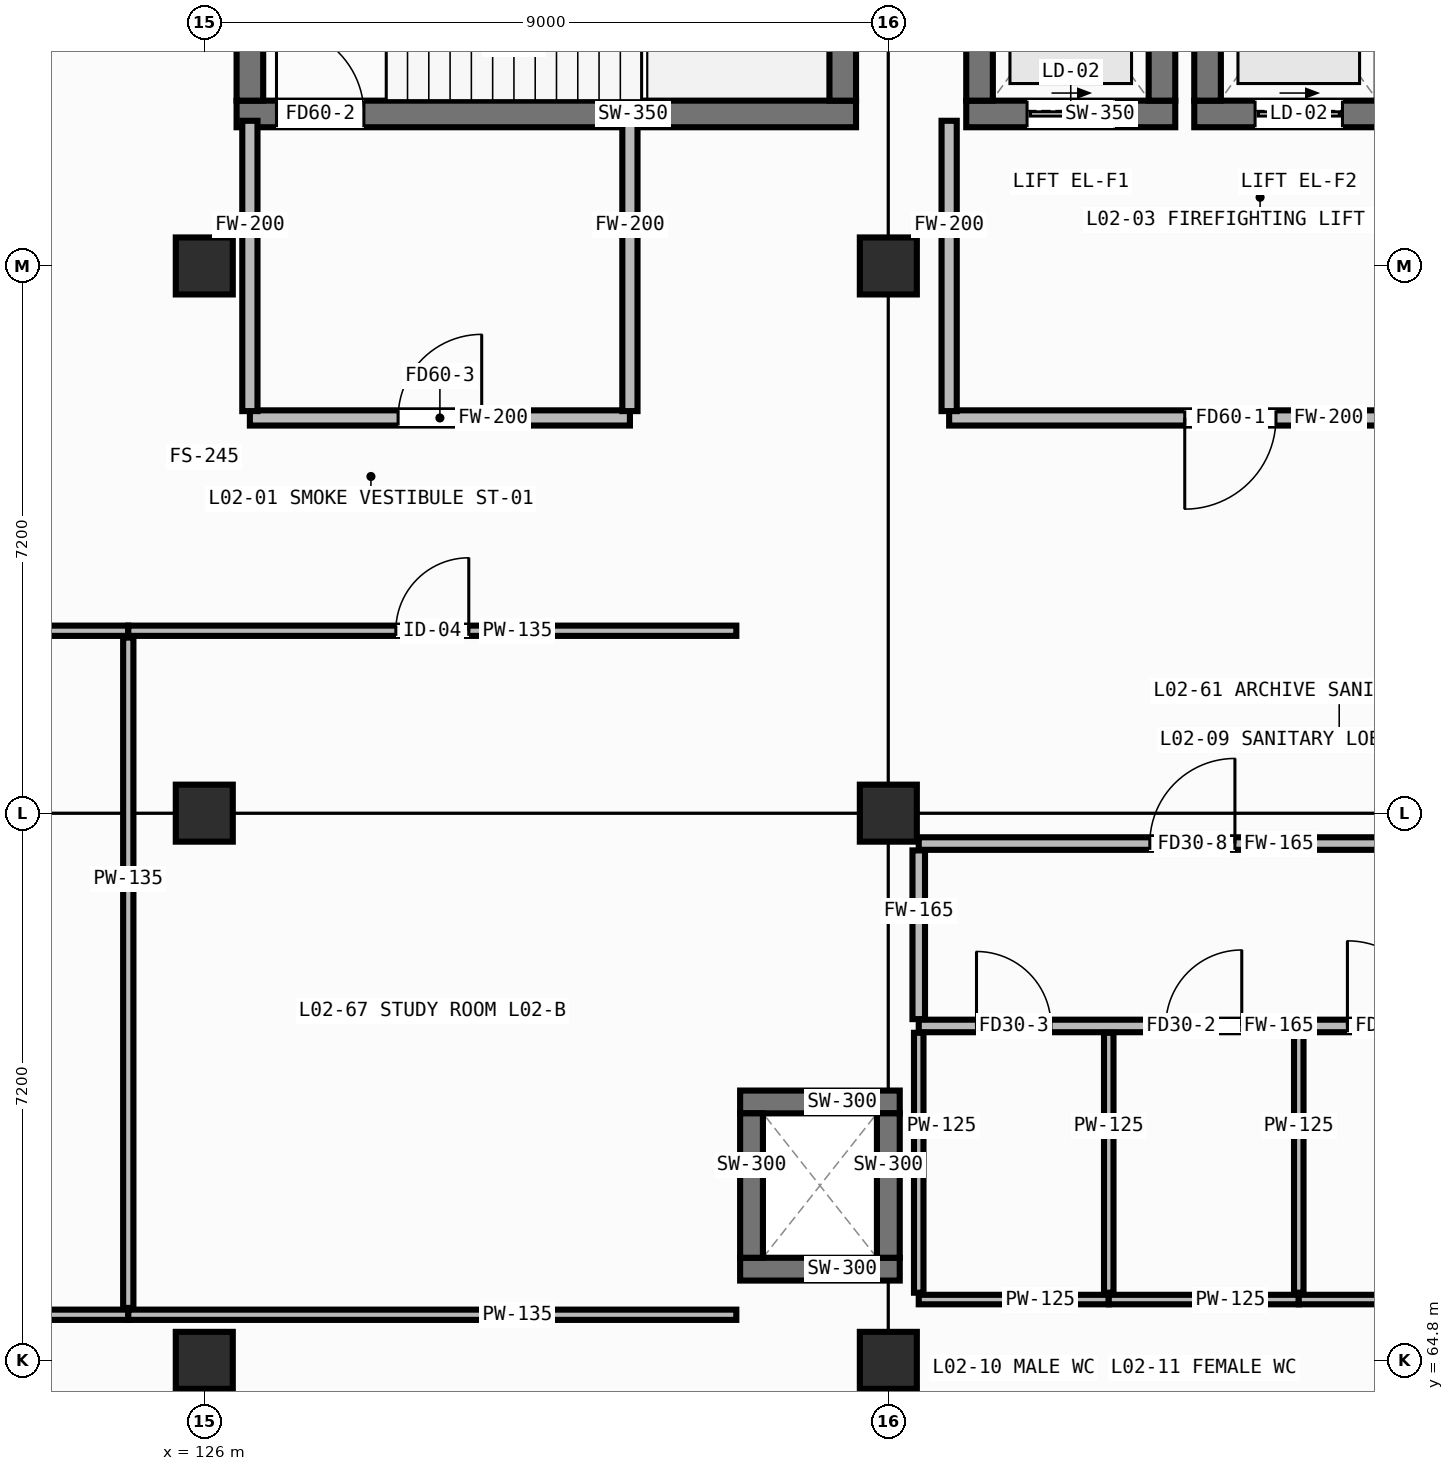
"""IFC4 building model, lengths in metres.
Left out: names, types, materials, properties, quantities, classifications, styles, units other than length and angle.
Written with IfcOpenShell. Run it as: python <this file> out.ifc"""

import sys

from ifc_helpers import new_model, si_unit, direction, frame, frame_2d, origin, origin_2d, place, context, subcontext, project, spatial, rectangle, hollow_rectangle, extrude, element, fill, save


model = new_model("IFC4")
c1 = context("Model", 3, precision=1e-05, world=origin(), true_north=direction((0.0, 1.0)))
c2 = subcontext(c1, "Body", "Model", "MODEL_VIEW")
j1 = project(units=[si_unit("LENGTHUNIT", "METRE"), si_unit("PLANEANGLEUNIT", "RADIAN")], contexts=[c1])
p1 = place(None, origin())
s1 = spatial("IfcSite", under=j1, at=p1, CompositionType="ELEMENT")
p2 = place(p1, origin())
s2 = spatial("IfcBuilding", under=s1, at=p2, CompositionType="ELEMENT")
p3 = place(p2, frame((0.0, 0.0, 4.8)))
s3 = spatial("IfcBuildingStorey", under=s2, at=p3, CompositionType="ELEMENT", Elevation=4.8)
for number, where, z_axis, x_axis in (
    (1, (126.0, 64.8, 0.0), (0.0, 0.0, 1.0), (1.0, 0.0, 0.0)),
    (2, (126.0, 72.0, 0.0), (0.0, 0.0, 1.0), (1.0, 0.0, 0.0)),
    (3, (126.0, 79.2, 0.0), (0.0, 0.0, 1.0), (1.0, 0.0, 0.0)),
    (4, (135.0, 64.8, 0.0), (0.0, 0.0, 1.0), (1.0, 0.0, 0.0)),
    (5, (135.0, 72.0, 0.0), (0.0, 0.0, 1.0), (1.0, 0.0, 0.0)),
    (6, (135.0, 79.2, 0.0), (0.0, 0.0, 1.0), (1.0, 0.0, 0.0)),
):
    element("IfcColumn", number, at=place(p3, frame(where, z_axis=z_axis, x_axis=x_axis)), inside=s3, PredefinedType="COLUMN", context=c2, shape_type="SweptSolid", body=[
        extrude(hollow_rectangle(XDim=0.75, YDim=0.75, WallThickness=0.032, at=origin_2d()), origin(), (0.0, 0.0, 1.0), 4.0),
    ])
p4 = place(p3, frame((126.425, 81.2, 0.0), z_axis=(0.0, 0.0, 1.0), x_axis=(1.0, 0.0, 0.0)))
e7 = element("IfcWall", 7, at=p4, inside=s3, PredefinedType="SHEAR", context=c2, shape_type="SweptSolid", body=[
    extrude(rectangle(XDim=8.15, YDim=0.35, at=frame_2d((4.075, 0.0))), origin(), (0.0, 0.0, 1.0), 3.755),
])
p5 = place(p4, frame((0.525, 0.0, 0.0)))
e8 = element("IfcOpeningElement", 8, at=p5, cuts=e7, PredefinedType="OPENING", context=c2, shape_type="SweptSolid", body=[
    extrude(rectangle(XDim=1.15, YDim=2.1, at=frame_2d((0.575, 1.05))), frame((0.0, 0.187, 0.0), z_axis=(0.0, -1.0, 0.0), x_axis=(1.0, 0.0, 0.0)), (0.0, 0.0, 1.0), 0.374),
])
for number, where, z_axis, x_axis in (
    (9, (126.6, 81.375, 0.0), (0.0, 0.0, 1.0), (0.0, 1.0, 0.0)),
    (10, (134.4, 81.375, 0.0), (0.0, 0.0, 1.0), (0.0, 1.0, 0.0)),
):
    element("IfcWall", number, at=place(p3, frame(where, z_axis=z_axis, x_axis=x_axis)), inside=s3, PredefinedType="SHEAR", context=c2, shape_type="SweptSolid", body=[
        extrude(rectangle(XDim=3.55, YDim=0.35, at=frame_2d((1.775, 0.0))), origin(), (0.0, 0.0, 1.0), 3.755),
    ])
p6 = place(p3, frame((136.025, 81.2, 0.0), z_axis=(0.0, 0.0, 1.0), x_axis=(1.0, 0.0, 0.0)))
e11 = element("IfcWall", 11, at=p6, inside=s3, PredefinedType="SHEAR", context=c2, shape_type="SweptSolid", body=[
    extrude(rectangle(XDim=2.75, YDim=0.35, at=frame_2d((1.375, 0.0))), origin(), (0.0, 0.0, 1.0), 3.755),
])
p7 = place(p6, frame((0.8, 0.0, 0.0)))
e12 = element("IfcOpeningElement", 12, at=p7, cuts=e11, PredefinedType="OPENING", context=c2, shape_type="SweptSolid", body=[
    extrude(rectangle(XDim=1.15, YDim=2.12, at=frame_2d((0.575, 1.06))), frame((0.0, 0.187, 0.0), z_axis=(0.0, -1.0, 0.0), x_axis=(1.0, 0.0, 0.0)), (0.0, 0.0, 1.0), 0.374),
])
for number, where, z_axis, x_axis in (
    (13, (136.2, 81.375, 0.0), (0.0, 0.0, 1.0), (0.0, 1.0, 0.0)),
    (14, (138.6, 81.375, 0.0), (0.0, 0.0, 1.0), (0.0, 1.0, 0.0)),
):
    element("IfcWall", number, at=place(p3, frame(where, z_axis=z_axis, x_axis=x_axis)), inside=s3, PredefinedType="SHEAR", context=c2, shape_type="SweptSolid", body=[
        extrude(rectangle(XDim=2.85, YDim=0.35, at=frame_2d((1.425, 0.0))), origin(), (0.0, 0.0, 1.0), 3.755),
    ])
p8 = place(p3, frame((139.025, 81.2, 0.0), z_axis=(0.0, 0.0, 1.0), x_axis=(1.0, 0.0, 0.0)))
e15 = element("IfcWall", 15, at=p8, inside=s3, PredefinedType="SHEAR", context=c2, shape_type="SweptSolid", body=[
    extrude(rectangle(XDim=2.75, YDim=0.35, at=frame_2d((1.375, 0.0))), origin(), (0.0, 0.0, 1.0), 3.755),
])
p9 = place(p8, frame((0.8, 0.0, 0.0)))
e16 = element("IfcOpeningElement", 16, at=p9, cuts=e15, PredefinedType="OPENING", context=c2, shape_type="SweptSolid", body=[
    extrude(rectangle(XDim=1.15, YDim=2.12, at=frame_2d((0.575, 1.06))), frame((0.0, 0.187, 0.0), z_axis=(0.0, -1.0, 0.0), x_axis=(1.0, 0.0, 0.0)), (0.0, 0.0, 1.0), 0.374),
])
p10 = place(p3, frame((139.2, 81.375, 0.0), z_axis=(0.0, 0.0, 1.0), x_axis=(0.0, 1.0, 0.0)))
e17 = element("IfcWall", 17, at=p10, inside=s3, PredefinedType="SHEAR", context=c2, shape_type="SweptSolid", body=[
    extrude(rectangle(XDim=2.85, YDim=0.35, at=frame_2d((1.425, 0.0))), origin(), (0.0, 0.0, 1.0), 3.755),
])
for number, where, z_axis, x_axis in (
    (18, (133.05, 66.0, 0.0), (0.0, 0.0, 1.0), (1.0, 0.0, 0.0)),
    (19, (133.05, 68.2, 0.0), (0.0, 0.0, 1.0), (1.0, 0.0, 0.0)),
):
    element("IfcWall", number, at=place(p3, frame(where, z_axis=z_axis, x_axis=x_axis)), inside=s3, PredefinedType="SHEAR", context=c2, shape_type="SweptSolid", body=[
        extrude(rectangle(XDim=2.1, YDim=0.3, at=frame_2d((1.05, 0.0))), origin(), (0.0, 0.0, 1.0), 3.755),
    ])
for number, where, z_axis, x_axis in (
    (20, (133.2, 66.15, 0.0), (0.0, 0.0, 1.0), (0.0, 1.0, 0.0)),
    (21, (135.0, 66.15, 0.0), (0.0, 0.0, 1.0), (0.0, 1.0, 0.0)),
):
    element("IfcWall", number, at=place(p3, frame(where, z_axis=z_axis, x_axis=x_axis)), inside=s3, PredefinedType="SHEAR", context=c2, shape_type="SweptSolid", body=[
        extrude(rectangle(XDim=1.9, YDim=0.3, at=frame_2d((0.95, 0.0))), origin(), (0.0, 0.0, 1.0), 3.755),
    ])
p11 = place(p3, frame((126.6, 77.2, 0.0), z_axis=(0.0, 0.0, 1.0), x_axis=(1.0, 0.0, 0.0)))
e22 = element("IfcWall", 22, at=p11, inside=s3, PredefinedType="PARTITIONING", context=c2, shape_type="SweptSolid", body=[
    extrude(rectangle(XDim=5.0, YDim=0.2, at=frame_2d((2.5, 0.0))), origin(), (0.0, 0.0, 1.0), 3.755),
])
p12 = place(p11, frame((1.95, 0.0, 0.0)))
e23 = element("IfcOpeningElement", 23, at=p12, cuts=e22, PredefinedType="OPENING", context=c2, shape_type="SweptSolid", body=[
    extrude(rectangle(XDim=1.1, YDim=2.08, at=frame_2d((0.55, 1.04))), frame((0.0, 0.112, 0.0), z_axis=(0.0, -1.0, 0.0), x_axis=(1.0, 0.0, 0.0)), (0.0, 0.0, 1.0), 0.224),
])
for number, where, z_axis, x_axis in (
    (24, (126.6, 77.29, 0.0), (0.0, 0.0, 1.0), (0.0, 1.0, 0.0)),
    (25, (131.6, 77.29, 0.0), (0.0, 0.0, 1.0), (0.0, 1.0, 0.0)),
):
    element("IfcWall", number, at=place(p3, frame(where, z_axis=z_axis, x_axis=x_axis)), inside=s3, PredefinedType="PARTITIONING", context=c2, shape_type="SweptSolid", body=[
        extrude(rectangle(XDim=3.82, YDim=0.2, at=frame_2d((1.91, 0.0))), origin(), (0.0, 0.0, 1.0), 3.755),
    ])
p13 = place(p3, frame((135.8, 77.2, 0.0), z_axis=(0.0, 0.0, 1.0), x_axis=(1.0, 0.0, 0.0)))
e26 = element("IfcWall", 26, at=p13, inside=s3, PredefinedType="PARTITIONING", context=c2, shape_type="SweptSolid", body=[
    extrude(rectangle(XDim=7.8, YDim=0.2, at=frame_2d((3.9, 0.0))), origin(), (0.0, 0.0, 1.0), 3.755),
])
p14 = place(p13, frame((3.1, 0.0, 0.0)))
e27 = element("IfcOpeningElement", 27, at=p14, cuts=e26, PredefinedType="OPENING", context=c2, shape_type="SweptSolid", body=[
    extrude(rectangle(XDim=1.2, YDim=2.1, at=frame_2d((0.6, 1.05))), frame((0.0, 0.112, 0.0), z_axis=(0.0, -1.0, 0.0), x_axis=(1.0, 0.0, 0.0)), (0.0, 0.0, 1.0), 0.224),
])
p15 = place(p3, frame((135.8, 77.29, 0.0), z_axis=(0.0, 0.0, 1.0), x_axis=(0.0, 1.0, 0.0)))
e28 = element("IfcWall", 28, at=p15, inside=s3, PredefinedType="PARTITIONING", context=c2, shape_type="SweptSolid", body=[
    extrude(rectangle(XDim=3.82, YDim=0.2, at=frame_2d((1.91, 0.0))), origin(), (0.0, 0.0, 1.0), 3.755),
])
p16 = place(p3, frame((135.4, 69.2, 0.0), z_axis=(0.0, 0.0, 1.0), x_axis=(1.0, 0.0, 0.0)))
e29 = element("IfcWall", 29, at=p16, inside=s3, PredefinedType="PARTITIONING", context=c2, shape_type="SweptSolid", body=[
    extrude(rectangle(XDim=7.4, YDim=0.165, at=frame_2d((3.7, 0.0))), origin(), (0.0, 0.0, 1.0), 3.755),
])
p17 = place(p16, frame((0.76, 0.0, 0.0)))
e30 = element("IfcOpeningElement", 30, at=p17, cuts=e29, PredefinedType="OPENING", context=c2, shape_type="SweptSolid", body=[
    extrude(rectangle(XDim=0.98, YDim=2.02, at=frame_2d((0.49, 1.01))), frame((0.0, 0.094, 0.0), z_axis=(0.0, -1.0, 0.0), x_axis=(1.0, 0.0, 0.0)), (0.0, 0.0, 1.0), 0.189),
])
p18 = place(p16, frame((3.25, 0.0, 0.0)))
e31 = element("IfcOpeningElement", 31, at=p18, cuts=e29, PredefinedType="OPENING", context=c2, shape_type="SweptSolid", body=[
    extrude(rectangle(XDim=1.0, YDim=2.08, at=frame_2d((0.5, 1.04))), frame((0.0, 0.094, 0.0), z_axis=(0.0, -1.0, 0.0), x_axis=(1.0, 0.0, 0.0)), (0.0, 0.0, 1.0), 0.189),
])
p19 = place(p16, frame((5.64, 0.0, 0.0)))
e32 = element("IfcOpeningElement", 32, at=p19, cuts=e29, PredefinedType="OPENING", context=c2, shape_type="SweptSolid", body=[
    extrude(rectangle(XDim=1.12, YDim=2.08, at=frame_2d((0.56, 1.04))), frame((0.0, 0.094, 0.0), z_axis=(0.0, -1.0, 0.0), x_axis=(1.0, 0.0, 0.0)), (0.0, 0.0, 1.0), 0.189),
])
p20 = place(p3, frame((135.4, 71.6, 0.0), z_axis=(0.0, 0.0, 1.0), x_axis=(1.0, 0.0, 0.0)))
e33 = element("IfcWall", 33, at=p20, inside=s3, PredefinedType="PARTITIONING", context=c2, shape_type="SweptSolid", body=[
    extrude(rectangle(XDim=7.4, YDim=0.165, at=frame_2d((3.7, 0.0))), origin(), (0.0, 0.0, 1.0), 3.755),
])
p21 = place(p20, frame((3.04, 0.0, 0.0)))
e34 = element("IfcOpeningElement", 34, at=p21, cuts=e33, PredefinedType="OPENING", context=c2, shape_type="SweptSolid", body=[
    extrude(rectangle(XDim=1.12, YDim=2.08, at=frame_2d((0.56, 1.04))), frame((0.0, 0.094, 0.0), z_axis=(0.0, -1.0, 0.0), x_axis=(1.0, 0.0, 0.0)), (0.0, 0.0, 1.0), 0.189),
])
p22 = place(p3, frame((135.4, 69.29, 0.0), z_axis=(0.0, 0.0, 1.0), x_axis=(0.0, 1.0, 0.0)))
e35 = element("IfcWall", 35, at=p22, inside=s3, PredefinedType="PARTITIONING", context=c2, shape_type="SweptSolid", body=[
    extrude(rectangle(XDim=2.22, YDim=0.165, at=frame_2d((1.11, 0.0))), origin(), (0.0, 0.0, 1.0), 3.755),
])
p23 = place(p3, frame((135.4, 65.6, 0.0), z_axis=(0.0, 0.0, 1.0), x_axis=(1.0, 0.0, 0.0)))
e36 = element("IfcWall", 36, at=p23, inside=s3, PredefinedType="PARTITIONING", context=c2, shape_type="SweptSolid", body=[
    extrude(rectangle(XDim=2.5, YDim=0.125, at=frame_2d((1.25, 0.0))), origin(), (0.0, 0.0, 1.0), 3.755),
])
for number, where, z_axis, x_axis in (
    (37, (135.4, 65.69, 0.0), (0.0, 0.0, 1.0), (0.0, 1.0, 0.0)),
    (38, (137.9, 65.69, 0.0), (0.0, 0.0, 1.0), (0.0, 1.0, 0.0)),
):
    element("IfcWall", number, at=place(p3, frame(where, z_axis=z_axis, x_axis=x_axis)), inside=s3, PredefinedType="PARTITIONING", context=c2, shape_type="SweptSolid", body=[
        extrude(rectangle(XDim=3.42, YDim=0.125, at=frame_2d((1.71, 0.0))), origin(), (0.0, 0.0, 1.0), 3.755),
    ])
p24 = place(p3, frame((137.9, 65.6, 0.0), z_axis=(0.0, 0.0, 1.0), x_axis=(1.0, 0.0, 0.0)))
e39 = element("IfcWall", 39, at=p24, inside=s3, PredefinedType="PARTITIONING", context=c2, shape_type="SweptSolid", body=[
    extrude(rectangle(XDim=2.5, YDim=0.125, at=frame_2d((1.25, 0.0))), origin(), (0.0, 0.0, 1.0), 3.755),
])
p25 = place(p3, frame((140.4, 65.69, 0.0), z_axis=(0.0, 0.0, 1.0), x_axis=(0.0, 1.0, 0.0)))
e40 = element("IfcWall", 40, at=p25, inside=s3, PredefinedType="PARTITIONING", context=c2, shape_type="SweptSolid", body=[
    extrude(rectangle(XDim=3.42, YDim=0.125, at=frame_2d((1.71, 0.0))), origin(), (0.0, 0.0, 1.0), 3.755),
])
p26 = place(p3, frame((140.4, 65.6, 0.0), z_axis=(0.0, 0.0, 1.0), x_axis=(1.0, 0.0, 0.0)))
e41 = element("IfcWall", 41, at=p26, inside=s3, PredefinedType="PARTITIONING", context=c2, shape_type="SweptSolid", body=[
    extrude(rectangle(XDim=2.4, YDim=0.125, at=frame_2d((1.2, 0.0))), origin(), (0.0, 0.0, 1.0), 3.755),
])
p27 = place(p3, frame((117.0, 65.4, 0.0), z_axis=(0.0, 0.0, 1.0), x_axis=(1.0, 0.0, 0.0)))
e42 = element("IfcWall", 42, at=p27, inside=s3, PredefinedType="PARTITIONING", context=c2, shape_type="SweptSolid", body=[
    extrude(rectangle(XDim=8.0, YDim=0.135, at=frame_2d((4.0, 0.0))), origin(), (0.0, 0.0, 1.0), 3.755),
])
p28 = place(p3, frame((117.0, 74.4, 0.0), z_axis=(0.0, 0.0, 1.0), x_axis=(1.0, 0.0, 0.0)))
e43 = element("IfcWall", 43, at=p28, inside=s3, PredefinedType="PARTITIONING", context=c2, shape_type="SweptSolid", body=[
    extrude(rectangle(XDim=8.0, YDim=0.135, at=frame_2d((4.0, 0.0))), origin(), (0.0, 0.0, 1.0), 3.755),
])
p29 = place(p28, frame((3.98, 0.0, 0.0)))
e44 = element("IfcOpeningElement", 44, at=p29, cuts=e43, PredefinedType="OPENING", context=c2, shape_type="SweptSolid", body=[
    extrude(rectangle(XDim=1.04, YDim=2.08, at=frame_2d((0.52, 1.04))), frame((0.0, 0.08, 0.0), z_axis=(0.0, -1.0, 0.0), x_axis=(1.0, 0.0, 0.0)), (0.0, 0.0, 1.0), 0.159),
])
p30 = place(p3, frame((125.0, 65.49, 0.0), z_axis=(0.0, 0.0, 1.0), x_axis=(0.0, 1.0, 0.0)))
e45 = element("IfcWall", 45, at=p30, inside=s3, PredefinedType="PARTITIONING", context=c2, shape_type="SweptSolid", body=[
    extrude(rectangle(XDim=8.82, YDim=0.135, at=frame_2d((4.41, 0.0))), origin(), (0.0, 0.0, 1.0), 3.755),
])
p31 = place(p3, frame((125.0, 65.4, 0.0), z_axis=(0.0, 0.0, 1.0), x_axis=(1.0, 0.0, 0.0)))
e46 = element("IfcWall", 46, at=p31, inside=s3, PredefinedType="PARTITIONING", context=c2, shape_type="SweptSolid", body=[
    extrude(rectangle(XDim=8.0, YDim=0.135, at=frame_2d((4.0, 0.0))), origin(), (0.0, 0.0, 1.0), 3.755),
])
p32 = place(p3, frame((125.0, 74.4, 0.0), z_axis=(0.0, 0.0, 1.0), x_axis=(1.0, 0.0, 0.0)))
e47 = element("IfcWall", 47, at=p32, inside=s3, PredefinedType="PARTITIONING", context=c2, shape_type="SweptSolid", body=[
    extrude(rectangle(XDim=8.0, YDim=0.135, at=frame_2d((4.0, 0.0))), origin(), (0.0, 0.0, 1.0), 3.755),
])
p33 = place(p32, frame((3.52, 0.0, 0.0)))
e48 = element("IfcOpeningElement", 48, at=p33, cuts=e47, PredefinedType="OPENING", context=c2, shape_type="SweptSolid", body=[
    extrude(rectangle(XDim=0.96, YDim=2.1, at=frame_2d((0.48, 1.05))), frame((0.0, 0.08, 0.0), z_axis=(0.0, -1.0, 0.0), x_axis=(1.0, 0.0, 0.0)), (0.0, 0.0, 1.0), 0.159),
])
p34 = place(p5, origin())
e49 = element("IfcDoor", 49, at=p34, inside=s3, OperationType="SINGLE_SWING_LEFT", PredefinedType="DOOR", context=c2, shape_type="SweptSolid", body=[
    extrude(rectangle(XDim=1.15, YDim=2.1, at=frame_2d((0.575, 1.05))), frame((0.0, 0.025, 0.0), z_axis=(0.0, -1.0, 0.0), x_axis=(1.0, 0.0, 0.0)), (0.0, 0.0, 1.0), 0.05),
])
fill(e8, e49)
p35 = place(p7, origin())
e50 = element("IfcDoor", 50, at=p35, inside=s3, OperationType="SLIDING_TO_LEFT", PredefinedType="DOOR", context=c2, shape_type="SweptSolid", body=[
    extrude(rectangle(XDim=1.15, YDim=2.12, at=frame_2d((0.575, 1.06))), frame((0.0, 0.025, 0.0), z_axis=(0.0, -1.0, 0.0), x_axis=(1.0, 0.0, 0.0)), (0.0, 0.0, 1.0), 0.05),
])
fill(e12, e50)
p36 = place(p9, origin())
e51 = element("IfcDoor", 51, at=p36, inside=s3, OperationType="SLIDING_TO_LEFT", PredefinedType="DOOR", context=c2, shape_type="SweptSolid", body=[
    extrude(rectangle(XDim=1.15, YDim=2.12, at=frame_2d((0.575, 1.06))), frame((0.0, 0.025, 0.0), z_axis=(0.0, -1.0, 0.0), x_axis=(1.0, 0.0, 0.0)), (0.0, 0.0, 1.0), 0.05),
])
fill(e16, e51)
p37 = place(p12, origin())
e52 = element("IfcDoor", 52, at=p37, inside=s3, OperationType="SINGLE_SWING_RIGHT", PredefinedType="DOOR", context=c2, shape_type="SweptSolid", body=[
    extrude(rectangle(XDim=1.1, YDim=2.08, at=frame_2d((0.55, 1.04))), frame((0.0, 0.025, 0.0), z_axis=(0.0, -1.0, 0.0), x_axis=(1.0, 0.0, 0.0)), (0.0, 0.0, 1.0), 0.05),
])
fill(e23, e52)
p38 = place(p14, frame((1.2, 0.0, 0.0), z_axis=(0.0, 0.0, 1.0), x_axis=(-1.0, 0.0, 0.0)))
e53 = element("IfcDoor", 53, at=p38, inside=s3, OperationType="SINGLE_SWING_RIGHT", PredefinedType="DOOR", context=c2, shape_type="SweptSolid", body=[
    extrude(rectangle(XDim=1.2, YDim=2.1, at=frame_2d((0.6, 1.05))), frame((0.0, 0.025, 0.0), z_axis=(0.0, -1.0, 0.0), x_axis=(1.0, 0.0, 0.0)), (0.0, 0.0, 1.0), 0.05),
])
fill(e27, e53)
p39 = place(p21, origin())
e54 = element("IfcDoor", 54, at=p39, inside=s3, OperationType="SINGLE_SWING_RIGHT", PredefinedType="DOOR", context=c2, shape_type="SweptSolid", body=[
    extrude(rectangle(XDim=1.12, YDim=2.08, at=frame_2d((0.56, 1.04))), frame((0.0, 0.025, 0.0), z_axis=(0.0, -1.0, 0.0), x_axis=(1.0, 0.0, 0.0)), (0.0, 0.0, 1.0), 0.05),
])
fill(e34, e54)
p40 = place(p17, origin())
e55 = element("IfcDoor", 55, at=p40, inside=s3, OperationType="SINGLE_SWING_LEFT", PredefinedType="DOOR", context=c2, shape_type="SweptSolid", body=[
    extrude(rectangle(XDim=0.98, YDim=2.02, at=frame_2d((0.49, 1.01))), frame((0.0, 0.025, 0.0), z_axis=(0.0, -1.0, 0.0), x_axis=(1.0, 0.0, 0.0)), (0.0, 0.0, 1.0), 0.05),
])
fill(e30, e55)
p41 = place(p18, origin())
e56 = element("IfcDoor", 56, at=p41, inside=s3, OperationType="SINGLE_SWING_RIGHT", PredefinedType="DOOR", context=c2, shape_type="SweptSolid", body=[
    extrude(rectangle(XDim=1.0, YDim=2.08, at=frame_2d((0.5, 1.04))), frame((0.0, 0.025, 0.0), z_axis=(0.0, -1.0, 0.0), x_axis=(1.0, 0.0, 0.0)), (0.0, 0.0, 1.0), 0.05),
])
fill(e31, e56)
p42 = place(p19, origin())
e57 = element("IfcDoor", 57, at=p42, inside=s3, OperationType="SINGLE_SWING_LEFT", PredefinedType="DOOR", context=c2, shape_type="SweptSolid", body=[
    extrude(rectangle(XDim=1.12, YDim=2.08, at=frame_2d((0.56, 1.04))), frame((0.0, 0.025, 0.0), z_axis=(0.0, -1.0, 0.0), x_axis=(1.0, 0.0, 0.0)), (0.0, 0.0, 1.0), 0.05),
])
fill(e32, e57)
p43 = place(p33, origin())
e58 = element("IfcDoor", 58, at=p43, inside=s3, OperationType="SINGLE_SWING_RIGHT", PredefinedType="DOOR", context=c2, shape_type="SweptSolid", body=[
    extrude(rectangle(XDim=0.96, YDim=2.1, at=frame_2d((0.48, 1.05))), frame((0.0, 0.025, 0.0), z_axis=(0.0, -1.0, 0.0), x_axis=(1.0, 0.0, 0.0)), (0.0, 0.0, 1.0), 0.05),
])
fill(e48, e58)
save(model, sys.argv[1])
